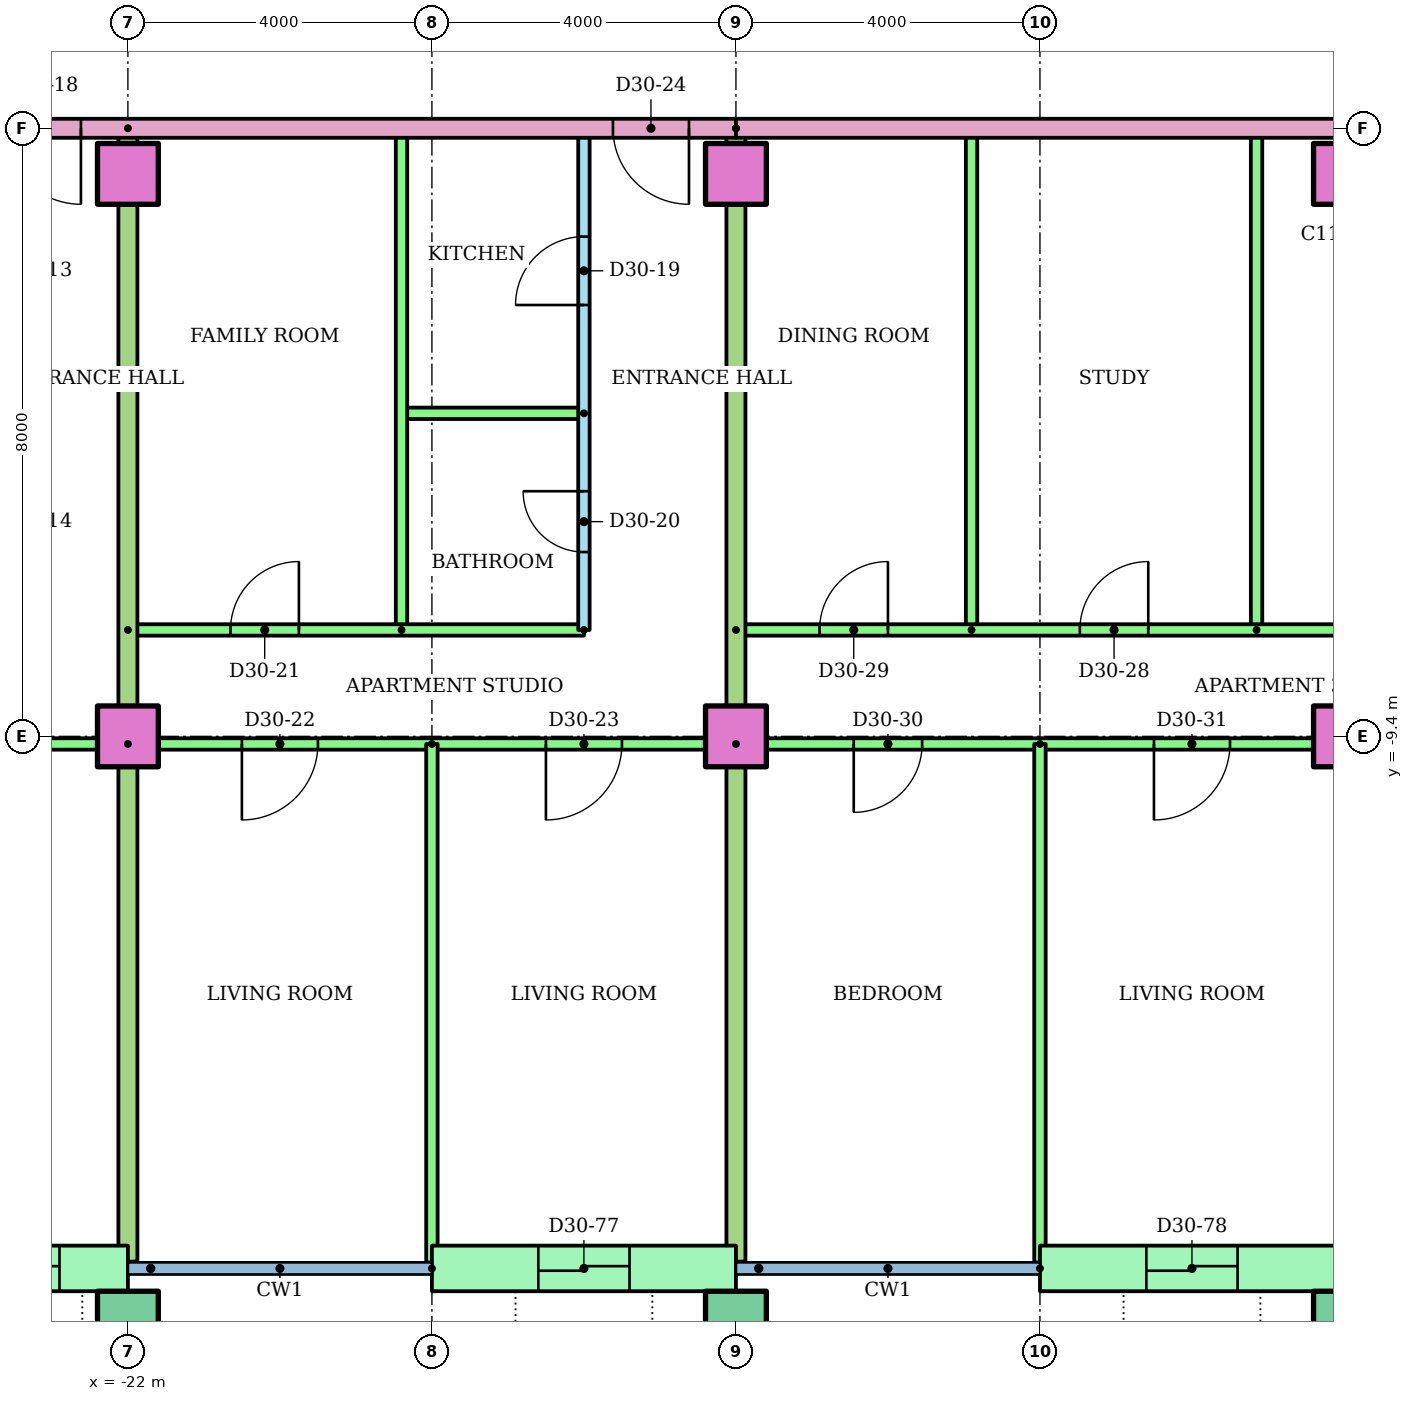
"""IFC4 building model, lengths in metres.
Left out: names, types, materials, properties, quantities, classifications, styles, units other than length and angle.
Written with IfcOpenShell. Run it as: python <this file> out.ifc"""

import sys

from ifc_helpers import new_model, si_unit, direction, frame, frame_2d, origin, origin_2d, place, context, subcontext, project, spatial, rectangle, hollow_rectangle, extrude, element, fill, save


model = new_model("IFC4")
c1 = context("Model", 3, precision=1e-05, world=origin(), true_north=direction((0.0, 1.0)))
c2 = subcontext(c1, "Body", "Model", "MODEL_VIEW")
j1 = project(units=[si_unit("LENGTHUNIT", "METRE"), si_unit("PLANEANGLEUNIT", "RADIAN")], contexts=[c1])
p1 = place(None, origin())
s1 = spatial("IfcSite", under=j1, at=p1, CompositionType="ELEMENT")
p2 = place(p1, origin())
s2 = spatial("IfcBuilding", under=s1, at=p2, CompositionType="ELEMENT")
p3 = place(p2, frame((0.0, 0.0, 119.8)))
s3 = spatial("IfcBuildingStorey", under=s2, at=p3, CompositionType="ELEMENT", Elevation=119.8)
for number, where in (
    (1, (-22.0, -17.1, 0.0)),
    (2, (-14.0, -17.1, 0.0)),
    (3, (-6.0, -17.1, 0.0)),
):
    element("IfcColumn", number, at=place(p3, frame(where)), inside=s3, PredefinedType="COLUMN", context=c2, shape_type="SweptSolid", body=[
        extrude(hollow_rectangle(XDim=0.8, YDim=0.8, WallThickness=0.04, at=origin_2d()), origin(), (0.0, 0.0, 1.0), 3.2),
    ])
for number, where in (
    (4, (-22.0, -9.4, 0.0)),
    (5, (-14.0, -9.4, 0.0)),
    (6, (-6.0, -9.4, 0.0)),
    (7, (-22.0, -2.0, 0.0)),
    (8, (-14.0, -2.0, 0.0)),
    (9, (-6.0, -2.0, 0.0)),
):
    element("IfcColumn", number, at=place(p3, frame(where)), inside=s3, PredefinedType="COLUMN", context=c2, shape_type="SweptSolid", body=[
        extrude(rectangle(XDim=0.8, YDim=0.8, at=origin_2d()), origin(), (0.0, 0.0, 1.0), 3.2),
    ])
p4 = place(p3, frame((-25.0, -16.4, 0.0)))
e10 = element("IfcWall", 10, at=p4, inside=s3, PredefinedType="STANDARD", context=c2, shape_type="SweptSolid", body=[
    extrude(rectangle(XDim=3.0, YDim=0.6, at=frame_2d((1.5, 0.0))), origin(), (0.0, 0.0, 1.0), 2.92),
])
p5 = place(p4, frame((0.9, 0.0, 0.0)))
e11 = element("IfcOpeningElement", 11, at=p5, cuts=e10, PredefinedType="OPENING", context=c2, shape_type="SweptSolid", body=[
    extrude(rectangle(XDim=1.2, YDim=2.1, at=frame_2d((0.6, 1.05))), frame((0.0, 0.31, 0.0), z_axis=(0.0, -1.0, 0.0), x_axis=(1.0, 0.0, 0.0)), (0.0, 0.0, 1.0), 0.62),
])
p6 = place(p3, frame((-18.0, -16.4, 0.0)))
e12 = element("IfcWall", 12, at=p6, inside=s3, PredefinedType="STANDARD", context=c2, shape_type="SweptSolid", body=[
    extrude(rectangle(XDim=4.0, YDim=0.6, at=frame_2d((2.0, 0.0))), origin(), (0.0, 0.0, 1.0), 2.92),
])
p7 = place(p6, frame((1.4, 0.0, 0.0)))
e13 = element("IfcOpeningElement", 13, at=p7, cuts=e12, PredefinedType="OPENING", context=c2, shape_type="SweptSolid", body=[
    extrude(rectangle(XDim=1.2, YDim=2.1, at=frame_2d((0.6, 1.05))), frame((0.0, 0.31, 0.0), z_axis=(0.0, -1.0, 0.0), x_axis=(1.0, 0.0, 0.0)), (0.0, 0.0, 1.0), 0.62),
])
p8 = place(p3, frame((-10.0, -16.4, 0.0)))
e14 = element("IfcWall", 14, at=p8, inside=s3, PredefinedType="STANDARD", context=c2, shape_type="SweptSolid", body=[
    extrude(rectangle(XDim=4.0, YDim=0.6, at=frame_2d((2.0, 0.0))), origin(), (0.0, 0.0, 1.0), 2.92),
])
p9 = place(p8, frame((1.4, 0.0, 0.0)))
e15 = element("IfcOpeningElement", 15, at=p9, cuts=e14, PredefinedType="OPENING", context=c2, shape_type="SweptSolid", body=[
    extrude(rectangle(XDim=1.2, YDim=2.1, at=frame_2d((0.6, 1.05))), frame((0.0, 0.31, 0.0), z_axis=(0.0, -1.0, 0.0), x_axis=(1.0, 0.0, 0.0)), (0.0, 0.0, 1.0), 0.62),
])
p10 = place(p3, frame((-22.0, -9.5, 0.0), z_axis=(0.0, 0.0, 1.0), x_axis=(-1.0, 0.0, 0.0)))
e16 = element("IfcWall", 16, at=p10, inside=s3, PredefinedType="PARTITIONING", context=c2, shape_type="SweptSolid", body=[
    extrude(rectangle(XDim=10.72, YDim=0.15, at=frame_2d((5.36, 0.0))), origin(), (0.0, 0.0, 1.0), 2.4),
])
p11 = place(p10, frame((8.618, 0.0, 0.0)))
e17 = element("IfcOpeningElement", 17, at=p11, cuts=e16, PredefinedType="OPENING", context=c2, shape_type="SweptSolid", body=[
    extrude(rectangle(XDim=0.9, YDim=2.1, at=frame_2d((0.45, 1.05))), frame((0.0, 0.085, 0.0), z_axis=(0.0, -1.0, 0.0), x_axis=(1.0, 0.0, 0.0)), (0.0, 0.0, 1.0), 0.17),
])
p12 = place(p10, frame((2.5, 0.0, 0.0)))
e18 = element("IfcOpeningElement", 18, at=p12, cuts=e16, PredefinedType="OPENING", context=c2, shape_type="SweptSolid", body=[
    extrude(rectangle(XDim=1.0, YDim=2.1, at=frame_2d((0.5, 1.05))), frame((0.0, 0.085, 0.0), z_axis=(0.0, -1.0, 0.0), x_axis=(1.0, 0.0, 0.0)), (0.0, 0.0, 1.0), 0.17),
])
p13 = place(p3, frame((-16.0, -8.0, 0.0), z_axis=(0.0, 0.0, 1.0), x_axis=(0.0, 1.0, 0.0)))
e19 = element("IfcWall", 19, at=p13, inside=s3, PredefinedType="PARTITIONING", context=c2, shape_type="SweptSolid", body=[
    extrude(rectangle(XDim=6.6, YDim=0.15, at=frame_2d((3.3, 0.0))), origin(), (0.0, 0.0, 1.0), 2.4),
])
p14 = place(p13, frame((4.275, 0.0, 0.0)))
e20 = element("IfcOpeningElement", 20, at=p14, cuts=e19, PredefinedType="OPENING", context=c2, shape_type="SweptSolid", body=[
    extrude(rectangle(XDim=0.9, YDim=2.1, at=frame_2d((0.45, 1.05))), frame((0.0, 0.085, 0.0), z_axis=(0.0, -1.0, 0.0), x_axis=(1.0, 0.0, 0.0)), (0.0, 0.0, 1.0), 0.17),
])
p15 = place(p13, frame((1.025, 0.0, 0.0)))
e21 = element("IfcOpeningElement", 21, at=p15, cuts=e19, PredefinedType="OPENING", context=c2, shape_type="SweptSolid", body=[
    extrude(rectangle(XDim=0.8, YDim=2.1, at=frame_2d((0.4, 1.05))), frame((0.0, 0.085, 0.0), z_axis=(0.0, -1.0, 0.0), x_axis=(1.0, 0.0, 0.0)), (0.0, 0.0, 1.0), 0.17),
])
p16 = place(p3, frame((-16.0, -5.15, 0.0), z_axis=(0.0, 0.0, 1.0), x_axis=(-1.0, 0.0, 0.0)))
e22 = element("IfcWall", 22, at=p16, inside=s3, PredefinedType="PARTITIONING", context=c2, shape_type="SweptSolid", body=[
    extrude(rectangle(XDim=2.4, YDim=0.15, at=frame_2d((1.2, 0.0))), origin(), (0.0, 0.0, 1.0), 2.4),
])
p17 = place(p3, frame((-18.4, -8.0, 0.0), z_axis=(0.0, 0.0, 1.0), x_axis=(0.0, 1.0, 0.0)))
e23 = element("IfcWall", 23, at=p17, inside=s3, PredefinedType="PARTITIONING", context=c2, shape_type="SweptSolid", body=[
    extrude(rectangle(XDim=6.6, YDim=0.15, at=frame_2d((3.3, 0.0))), origin(), (0.0, 0.0, 1.0), 2.4),
])
p18 = place(p3, frame((-22.0, -8.0, 0.0)))
e24 = element("IfcWall", 24, at=p18, inside=s3, PredefinedType="PARTITIONING", context=c2, shape_type="SweptSolid", body=[
    extrude(rectangle(XDim=6.0, YDim=0.15, at=frame_2d((3.0, 0.0))), origin(), (0.0, 0.0, 1.0), 2.4),
])
p19 = place(p18, frame((1.35, 0.0, 0.0)))
e25 = element("IfcOpeningElement", 25, at=p19, cuts=e24, PredefinedType="OPENING", context=c2, shape_type="SweptSolid", body=[
    extrude(rectangle(XDim=0.9, YDim=2.1, at=frame_2d((0.45, 1.05))), frame((0.0, 0.085, 0.0), z_axis=(0.0, -1.0, 0.0), x_axis=(1.0, 0.0, 0.0)), (0.0, 0.0, 1.0), 0.17),
])
p20 = place(p3, frame((-14.0, -9.5, 0.0), z_axis=(0.0, 0.0, 1.0), x_axis=(-1.0, 0.0, 0.0)))
e26 = element("IfcWall", 26, at=p20, inside=s3, PredefinedType="PARTITIONING", context=c2, shape_type="SweptSolid", body=[
    extrude(rectangle(XDim=8.0, YDim=0.15, at=frame_2d((4.0, 0.0))), origin(), (0.0, 0.0, 1.0), 2.4),
])
p21 = place(p20, frame((5.5, 0.0, 0.0)))
e27 = element("IfcOpeningElement", 27, at=p21, cuts=e26, PredefinedType="OPENING", context=c2, shape_type="SweptSolid", body=[
    extrude(rectangle(XDim=1.0, YDim=2.1, at=frame_2d((0.5, 1.05))), frame((0.0, 0.085, 0.0), z_axis=(0.0, -1.0, 0.0), x_axis=(1.0, 0.0, 0.0)), (0.0, 0.0, 1.0), 0.17),
])
p22 = place(p20, frame((1.5, 0.0, 0.0)))
e28 = element("IfcOpeningElement", 28, at=p22, cuts=e26, PredefinedType="OPENING", context=c2, shape_type="SweptSolid", body=[
    extrude(rectangle(XDim=1.0, YDim=2.1, at=frame_2d((0.5, 1.05))), frame((0.0, 0.085, 0.0), z_axis=(0.0, -1.0, 0.0), x_axis=(1.0, 0.0, 0.0)), (0.0, 0.0, 1.0), 0.17),
])
p23 = place(p3, frame((-18.0, -9.5, 0.0), z_axis=(0.0, 0.0, 1.0), x_axis=(0.0, -1.0, 0.0)))
e29 = element("IfcWall", 29, at=p23, inside=s3, PredefinedType="PARTITIONING", context=c2, shape_type="SweptSolid", body=[
    extrude(rectangle(XDim=6.821, YDim=0.15, at=frame_2d((3.411, 0.0))), origin(), (0.0, 0.0, 1.0), 2.4),
])
p24 = place(p3, frame((-22.0, -1.4, 0.0), z_axis=(0.0, 0.0, 1.0), x_axis=(0.0, -1.0, 0.0)))
e30 = element("IfcWall", 30, at=p24, inside=s3, PredefinedType="PARTITIONING", context=c2, shape_type="SweptSolid", body=[
    extrude(rectangle(XDim=14.91, YDim=0.25, at=frame_2d((7.455, 0.0))), origin(), (0.0, 0.0, 1.0), 2.4),
])
for number, where, z_axis, x_axis in (
    (31, (-7.15, -8.0, 0.0), (0.0, 0.0, 1.0), (0.0, 1.0, 0.0)),
    (32, (-10.9, -8.0, 0.0), (0.0, 0.0, 1.0), (0.0, 1.0, 0.0)),
):
    element("IfcWall", number, at=place(p3, frame(where, z_axis=z_axis, x_axis=x_axis)), inside=s3, PredefinedType="PARTITIONING", context=c2, shape_type="SweptSolid", body=[
        extrude(rectangle(XDim=6.6, YDim=0.15, at=frame_2d((3.3, 0.0))), origin(), (0.0, 0.0, 1.0), 2.4),
    ])
p25 = place(p3, frame((-14.0, -8.0, 0.0)))
e33 = element("IfcWall", 33, at=p25, inside=s3, PredefinedType="PARTITIONING", context=c2, shape_type="SweptSolid", body=[
    extrude(rectangle(XDim=14.0, YDim=0.15, at=frame_2d((7.0, 0.0))), origin(), (0.0, 0.0, 1.0), 2.4),
])
p26 = place(p25, frame((8.775, 0.0, 0.0)))
e34 = element("IfcOpeningElement", 34, at=p26, cuts=e33, PredefinedType="OPENING", context=c2, shape_type="SweptSolid", body=[
    extrude(rectangle(XDim=0.9, YDim=2.1, at=frame_2d((0.45, 1.05))), frame((0.0, 0.085, 0.0), z_axis=(0.0, -1.0, 0.0), x_axis=(1.0, 0.0, 0.0)), (0.0, 0.0, 1.0), 0.17),
])
p27 = place(p25, frame((4.525, 0.0, 0.0)))
e35 = element("IfcOpeningElement", 35, at=p27, cuts=e33, PredefinedType="OPENING", context=c2, shape_type="SweptSolid", body=[
    extrude(rectangle(XDim=0.9, YDim=2.1, at=frame_2d((0.45, 1.05))), frame((0.0, 0.085, 0.0), z_axis=(0.0, -1.0, 0.0), x_axis=(1.0, 0.0, 0.0)), (0.0, 0.0, 1.0), 0.17),
])
p28 = place(p25, frame((1.1, 0.0, 0.0)))
e36 = element("IfcOpeningElement", 36, at=p28, cuts=e33, PredefinedType="OPENING", context=c2, shape_type="SweptSolid", body=[
    extrude(rectangle(XDim=0.9, YDim=2.1, at=frame_2d((0.45, 1.05))), frame((0.0, 0.085, 0.0), z_axis=(0.0, -1.0, 0.0), x_axis=(1.0, 0.0, 0.0)), (0.0, 0.0, 1.0), 0.17),
])
p29 = place(p3, frame((2.0, -9.5, 0.0), z_axis=(0.0, 0.0, 1.0), x_axis=(-1.0, 0.0, 0.0)))
e37 = element("IfcWall", 37, at=p29, inside=s3, PredefinedType="PARTITIONING", context=c2, shape_type="SweptSolid", body=[
    extrude(rectangle(XDim=16.0, YDim=0.15, at=frame_2d((8.0, 0.0))), origin(), (0.0, 0.0, 1.0), 2.4),
])
p30 = place(p29, frame((13.55, 0.0, 0.0)))
e38 = element("IfcOpeningElement", 38, at=p30, cuts=e37, PredefinedType="OPENING", context=c2, shape_type="SweptSolid", body=[
    extrude(rectangle(XDim=0.9, YDim=2.1, at=frame_2d((0.45, 1.05))), frame((0.0, 0.085, 0.0), z_axis=(0.0, -1.0, 0.0), x_axis=(1.0, 0.0, 0.0)), (0.0, 0.0, 1.0), 0.17),
])
p31 = place(p29, frame((9.5, 0.0, 0.0)))
e39 = element("IfcOpeningElement", 39, at=p31, cuts=e37, PredefinedType="OPENING", context=c2, shape_type="SweptSolid", body=[
    extrude(rectangle(XDim=1.0, YDim=2.1, at=frame_2d((0.5, 1.05))), frame((0.0, 0.085, 0.0), z_axis=(0.0, -1.0, 0.0), x_axis=(1.0, 0.0, 0.0)), (0.0, 0.0, 1.0), 0.17),
])
p32 = place(p29, frame((5.55, 0.0, 0.0)))
e40 = element("IfcOpeningElement", 40, at=p32, cuts=e37, PredefinedType="OPENING", context=c2, shape_type="SweptSolid", body=[
    extrude(rectangle(XDim=0.9, YDim=2.1, at=frame_2d((0.45, 1.05))), frame((0.0, 0.085, 0.0), z_axis=(0.0, -1.0, 0.0), x_axis=(1.0, 0.0, 0.0)), (0.0, 0.0, 1.0), 0.17),
])
p33 = place(p29, frame((1.55, 0.0, 0.0)))
e41 = element("IfcOpeningElement", 41, at=p33, cuts=e37, PredefinedType="OPENING", context=c2, shape_type="SweptSolid", body=[
    extrude(rectangle(XDim=0.9, YDim=2.1, at=frame_2d((0.45, 1.05))), frame((0.0, 0.085, 0.0), z_axis=(0.0, -1.0, 0.0), x_axis=(1.0, 0.0, 0.0)), (0.0, 0.0, 1.0), 0.17),
])
p34 = place(p3, frame((-10.0, -9.5, 0.0), z_axis=(0.0, 0.0, 1.0), x_axis=(0.0, -1.0, 0.0)))
e42 = element("IfcWall", 42, at=p34, inside=s3, PredefinedType="PARTITIONING", context=c2, shape_type="SweptSolid", body=[
    extrude(rectangle(XDim=6.821, YDim=0.15, at=frame_2d((3.411, 0.0))), origin(), (0.0, 0.0, 1.0), 2.4),
])
p35 = place(p3, frame((-14.0, -1.4, 0.0), z_axis=(0.0, 0.0, 1.0), x_axis=(0.0, -1.0, 0.0)))
e43 = element("IfcWall", 43, at=p35, inside=s3, PredefinedType="PARTITIONING", context=c2, shape_type="SweptSolid", body=[
    extrude(rectangle(XDim=14.91, YDim=0.25, at=frame_2d((7.455, 0.0))), origin(), (0.0, 0.0, 1.0), 2.4),
])
p36 = place(p3, frame((-14.0, -1.4, 0.0), z_axis=(0.0, 0.0, 1.0), x_axis=(-1.0, 0.0, 0.0)))
e44 = element("IfcWall", 44, at=p36, inside=s3, PredefinedType="PARTITIONING", context=c2, shape_type="SweptSolid", body=[
    extrude(rectangle(XDim=15.0, YDim=0.25, at=frame_2d((7.5, 0.0))), origin(), (0.0, 0.0, 1.0), 2.4),
])
p37 = place(p36, frame((8.618, 0.0, 0.0)))
e45 = element("IfcOpeningElement", 45, at=p37, cuts=e44, PredefinedType="OPENING", context=c2, shape_type="SweptSolid", body=[
    extrude(rectangle(XDim=1.0, YDim=2.1, at=frame_2d((0.5, 1.05))), frame((0.0, 0.135, 0.0), z_axis=(0.0, -1.0, 0.0), x_axis=(1.0, 0.0, 0.0)), (0.0, 0.0, 1.0), 0.27),
])
p38 = place(p36, frame((0.618, 0.0, 0.0)))
e46 = element("IfcOpeningElement", 46, at=p38, cuts=e44, PredefinedType="OPENING", context=c2, shape_type="SweptSolid", body=[
    extrude(rectangle(XDim=1.0, YDim=2.1, at=frame_2d((0.5, 1.05))), frame((0.0, 0.135, 0.0), z_axis=(0.0, -1.0, 0.0), x_axis=(1.0, 0.0, 0.0)), (0.0, 0.0, 1.0), 0.27),
])
p39 = place(p3, frame((14.0, -1.4, 0.0), z_axis=(0.0, 0.0, 1.0), x_axis=(-1.0, 0.0, 0.0)))
e47 = element("IfcWall", 47, at=p39, inside=s3, PredefinedType="PARTITIONING", context=c2, shape_type="SweptSolid", body=[
    extrude(rectangle(XDim=28.0, YDim=0.25, at=frame_2d((14.0, 0.0))), origin(), (0.0, 0.0, 1.0), 2.4),
])
p40 = place(p39, frame((12.618, 0.0, 0.0)))
e48 = element("IfcOpeningElement", 48, at=p40, cuts=e47, PredefinedType="OPENING", context=c2, shape_type="SweptSolid", body=[
    extrude(rectangle(XDim=1.0, YDim=2.1, at=frame_2d((0.5, 1.05))), frame((0.0, 0.135, 0.0), z_axis=(0.0, -1.0, 0.0), x_axis=(1.0, 0.0, 0.0)), (0.0, 0.0, 1.0), 0.27),
])
p41 = place(p39, frame((10.382, 0.0, 0.0)))
e49 = element("IfcOpeningElement", 49, at=p41, cuts=e47, PredefinedType="OPENING", context=c2, shape_type="SweptSolid", body=[
    extrude(rectangle(XDim=1.0, YDim=2.1, at=frame_2d((0.5, 1.05))), frame((0.0, 0.135, 0.0), z_axis=(0.0, -1.0, 0.0), x_axis=(1.0, 0.0, 0.0)), (0.0, 0.0, 1.0), 0.27),
])
p42 = place(p37, origin())
e50 = element("IfcDoor", 50, at=p42, inside=s3, OperationType="SINGLE_SWING_LEFT", PredefinedType="DOOR", context=c2, shape_type="SweptSolid", body=[
    extrude(rectangle(XDim=1.0, YDim=2.1, at=frame_2d((0.5, 1.05))), frame((0.0, 0.025, 0.0), z_axis=(0.0, -1.0, 0.0), x_axis=(1.0, 0.0, 0.0)), (0.0, 0.0, 1.0), 0.05),
])
fill(e45, e50)
p43 = place(p14, origin())
e51 = element("IfcDoor", 51, at=p43, inside=s3, OperationType="SINGLE_SWING_LEFT", PredefinedType="DOOR", context=c2, shape_type="SweptSolid", body=[
    extrude(rectangle(XDim=0.9, YDim=2.1, at=frame_2d((0.45, 1.05))), frame((0.0, 0.025, 0.0), z_axis=(0.0, -1.0, 0.0), x_axis=(1.0, 0.0, 0.0)), (0.0, 0.0, 1.0), 0.05),
])
fill(e20, e51)
p44 = place(p15, origin())
e52 = element("IfcDoor", 52, at=p44, inside=s3, OperationType="SINGLE_SWING_RIGHT", PredefinedType="DOOR", context=c2, shape_type="SweptSolid", body=[
    extrude(rectangle(XDim=0.8, YDim=2.1, at=frame_2d((0.4, 1.05))), frame((0.0, 0.025, 0.0), z_axis=(0.0, -1.0, 0.0), x_axis=(1.0, 0.0, 0.0)), (0.0, 0.0, 1.0), 0.05),
])
fill(e21, e52)
p45 = place(p19, origin())
e53 = element("IfcDoor", 53, at=p45, inside=s3, OperationType="SINGLE_SWING_RIGHT", PredefinedType="DOOR", context=c2, shape_type="SweptSolid", body=[
    extrude(rectangle(XDim=0.9, YDim=2.1, at=frame_2d((0.45, 1.05))), frame((0.0, 0.025, 0.0), z_axis=(0.0, -1.0, 0.0), x_axis=(1.0, 0.0, 0.0)), (0.0, 0.0, 1.0), 0.05),
])
fill(e25, e53)
p46 = place(p21, origin())
e54 = element("IfcDoor", 54, at=p46, inside=s3, OperationType="SINGLE_SWING_RIGHT", PredefinedType="DOOR", context=c2, shape_type="SweptSolid", body=[
    extrude(rectangle(XDim=1.0, YDim=2.1, at=frame_2d((0.5, 1.05))), frame((0.0, 0.025, 0.0), z_axis=(0.0, -1.0, 0.0), x_axis=(1.0, 0.0, 0.0)), (0.0, 0.0, 1.0), 0.05),
])
fill(e27, e54)
p47 = place(p22, origin())
e55 = element("IfcDoor", 55, at=p47, inside=s3, OperationType="SINGLE_SWING_RIGHT", PredefinedType="DOOR", context=c2, shape_type="SweptSolid", body=[
    extrude(rectangle(XDim=1.0, YDim=2.1, at=frame_2d((0.5, 1.05))), frame((0.0, 0.025, 0.0), z_axis=(0.0, -1.0, 0.0), x_axis=(1.0, 0.0, 0.0)), (0.0, 0.0, 1.0), 0.05),
])
fill(e28, e55)
p48 = place(p38, origin())
e56 = element("IfcDoor", 56, at=p48, inside=s3, OperationType="SINGLE_SWING_LEFT", PredefinedType="DOOR", context=c2, shape_type="SweptSolid", body=[
    extrude(rectangle(XDim=1.0, YDim=2.1, at=frame_2d((0.5, 1.05))), frame((0.0, 0.025, 0.0), z_axis=(0.0, -1.0, 0.0), x_axis=(1.0, 0.0, 0.0)), (0.0, 0.0, 1.0), 0.05),
])
fill(e46, e56)
p49 = place(p27, origin())
e57 = element("IfcDoor", 57, at=p49, inside=s3, OperationType="SINGLE_SWING_RIGHT", PredefinedType="DOOR", context=c2, shape_type="SweptSolid", body=[
    extrude(rectangle(XDim=0.9, YDim=2.1, at=frame_2d((0.45, 1.05))), frame((0.0, 0.025, 0.0), z_axis=(0.0, -1.0, 0.0), x_axis=(1.0, 0.0, 0.0)), (0.0, 0.0, 1.0), 0.05),
])
fill(e35, e57)
p50 = place(p28, origin())
e58 = element("IfcDoor", 58, at=p50, inside=s3, OperationType="SINGLE_SWING_RIGHT", PredefinedType="DOOR", context=c2, shape_type="SweptSolid", body=[
    extrude(rectangle(XDim=0.9, YDim=2.1, at=frame_2d((0.45, 1.05))), frame((0.0, 0.025, 0.0), z_axis=(0.0, -1.0, 0.0), x_axis=(1.0, 0.0, 0.0)), (0.0, 0.0, 1.0), 0.05),
])
fill(e36, e58)
p51 = place(p30, origin())
e59 = element("IfcDoor", 59, at=p51, inside=s3, OperationType="SINGLE_SWING_RIGHT", PredefinedType="DOOR", context=c2, shape_type="SweptSolid", body=[
    extrude(rectangle(XDim=0.9, YDim=2.1, at=frame_2d((0.45, 1.05))), frame((0.0, 0.025, 0.0), z_axis=(0.0, -1.0, 0.0), x_axis=(1.0, 0.0, 0.0)), (0.0, 0.0, 1.0), 0.05),
])
fill(e38, e59)
p52 = place(p31, origin())
e60 = element("IfcDoor", 60, at=p52, inside=s3, OperationType="SINGLE_SWING_RIGHT", PredefinedType="DOOR", context=c2, shape_type="SweptSolid", body=[
    extrude(rectangle(XDim=1.0, YDim=2.1, at=frame_2d((0.5, 1.05))), frame((0.0, 0.025, 0.0), z_axis=(0.0, -1.0, 0.0), x_axis=(1.0, 0.0, 0.0)), (0.0, 0.0, 1.0), 0.05),
])
fill(e39, e60)
p53 = place(p5, origin())
e61 = element("IfcDoor", 61, at=p53, inside=s3, OperationType="SLIDING_TO_LEFT", PredefinedType="DOOR", context=c2, shape_type="SweptSolid", body=[
    extrude(rectangle(XDim=1.2, YDim=2.1, at=frame_2d((0.6, 1.05))), frame((0.0, 0.025, 0.0), z_axis=(0.0, -1.0, 0.0), x_axis=(1.0, 0.0, 0.0)), (0.0, 0.0, 1.0), 0.05),
])
fill(e11, e61)
p54 = place(p7, origin())
e62 = element("IfcDoor", 62, at=p54, inside=s3, OperationType="SLIDING_TO_LEFT", PredefinedType="DOOR", context=c2, shape_type="SweptSolid", body=[
    extrude(rectangle(XDim=1.2, YDim=2.1, at=frame_2d((0.6, 1.05))), frame((0.0, 0.025, 0.0), z_axis=(0.0, -1.0, 0.0), x_axis=(1.0, 0.0, 0.0)), (0.0, 0.0, 1.0), 0.05),
])
fill(e13, e62)
p55 = place(p9, origin())
e63 = element("IfcDoor", 63, at=p55, inside=s3, OperationType="SLIDING_TO_LEFT", PredefinedType="DOOR", context=c2, shape_type="SweptSolid", body=[
    extrude(rectangle(XDim=1.2, YDim=2.1, at=frame_2d((0.6, 1.05))), frame((0.0, 0.025, 0.0), z_axis=(0.0, -1.0, 0.0), x_axis=(1.0, 0.0, 0.0)), (0.0, 0.0, 1.0), 0.05),
])
fill(e15, e63)
save(model, sys.argv[1])
